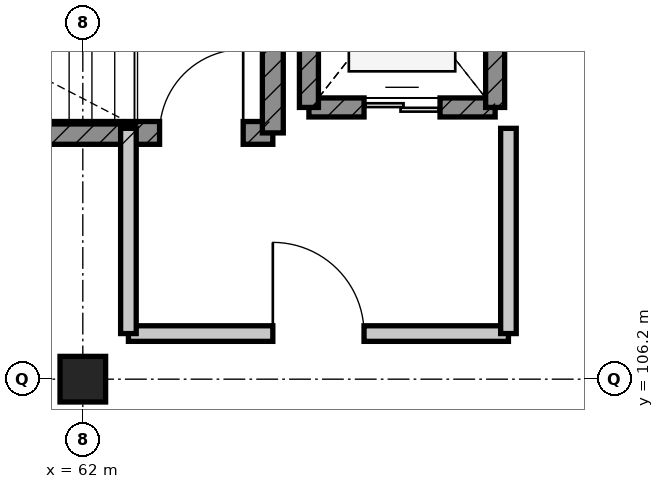
"""IFC4 building model, lengths in metres.
Left out: names, types, materials, properties, quantities, classifications, styles, units other than length and angle.
Written with IfcOpenShell. Run it as: python <this file> out.ifc"""

import sys

from ifc_helpers import new_model, si_unit, direction, frame, frame_2d, origin, origin_2d, place, context, subcontext, project, spatial, rectangle, extrude, element, fill, save


model = new_model("IFC4")
c1 = context("Model", 3, precision=1e-05, world=origin(), true_north=direction((0.0, 1.0)))
c2 = subcontext(c1, "Body", "Model", "MODEL_VIEW")
j1 = project(units=[si_unit("LENGTHUNIT", "METRE"), si_unit("PLANEANGLEUNIT", "RADIAN")], contexts=[c1])
p1 = place(None, origin())
s1 = spatial("IfcSite", under=j1, at=p1, CompositionType="ELEMENT")
p2 = place(p1, origin())
s2 = spatial("IfcBuilding", under=s1, at=p2, CompositionType="ELEMENT")
p3 = place(p2, frame((0.0, 0.0, 33.6)))
s3 = spatial("IfcBuildingStorey", under=s2, at=p3, CompositionType="ELEMENT", Elevation=33.6)
p4 = place(p3, frame((62.0, 106.2, 0.0), z_axis=(0.0, 0.0, 1.0), x_axis=(1.0, 0.0, 0.0)))
e1 = element("IfcColumn", 1, at=p4, inside=s3, PredefinedType="COLUMN", context=c2, shape_type="SweptSolid", body=[
    extrude(rectangle(XDim=0.6, YDim=0.6, at=origin_2d()), origin(), (0.0, 0.0, 1.0), 3.6),
])
p5 = place(p3, frame((56.1, 109.44, 0.0), z_axis=(0.0, 0.0, 1.0), x_axis=(1.0, 0.0, 0.0)))
e2 = element("IfcWall", 2, at=p5, inside=s3, PredefinedType="SHEAR", context=c2, shape_type="SweptSolid", body=[
    extrude(rectangle(XDim=8.4, YDim=0.3, at=frame_2d((4.2, 0.0))), origin(), (0.0, 0.0, 1.0), 3.36),
])
p6 = place(p5, frame((6.91, 0.0, 0.0)))
e3 = element("IfcOpeningElement", 3, at=p6, cuts=e2, PredefinedType="OPENING", context=c2, shape_type="SweptSolid", body=[
    extrude(rectangle(XDim=1.1, YDim=2.1, at=frame_2d((0.55, 1.05))), frame((0.0, 0.16, 0.0), z_axis=(0.0, -1.0, 0.0), x_axis=(1.0, 0.0, 0.0)), (0.0, 0.0, 1.0), 0.32),
])
p7 = place(p3, frame((64.5, 109.44, 0.0), z_axis=(0.0, 0.0, 1.0), x_axis=(0.0, 1.0, 0.0)))
e4 = element("IfcWall", 4, at=p7, inside=s3, PredefinedType="SHEAR", context=c2, shape_type="SweptSolid", body=[
    extrude(rectangle(XDim=3.56, YDim=0.275, at=frame_2d((1.78, 0.0))), origin(), (0.0, 0.0, 1.0), 3.36),
])
p8 = place(p3, frame((64.975, 109.775, 0.0), z_axis=(0.0, 0.0, 1.0), x_axis=(1.0, 0.0, 0.0)))
e5 = element("IfcWall", 5, at=p8, inside=s3, PredefinedType="SHEAR", context=c2, shape_type="SweptSolid", body=[
    extrude(rectangle(XDim=2.45, YDim=0.25, at=frame_2d((1.225, 0.0))), origin(), (0.0, 0.0, 1.0), 3.36),
])
p9 = place(p8, frame((0.725, 0.0, 0.0)))
e6 = element("IfcOpeningElement", 6, at=p9, cuts=e5, PredefinedType="OPENING", context=c2, shape_type="SweptSolid", body=[
    extrude(rectangle(XDim=1.0, YDim=2.15, at=frame_2d((0.5, 1.075))), frame((0.0, 0.135, 0.0), z_axis=(0.0, -1.0, 0.0), x_axis=(1.0, 0.0, 0.0)), (0.0, 0.0, 1.0), 0.27),
])
for number, where, z_axis, x_axis in (
    (7, (67.425, 109.775, 0.0), (0.0, 0.0, 1.0), (0.0, 1.0, 0.0)),
    (8, (64.975, 112.825, 0.0), (0.0, 0.0, 1.0), (0.0, -1.0, 0.0)),
):
    element("IfcWall", number, at=place(p3, frame(where, z_axis=z_axis, x_axis=x_axis)), inside=s3, PredefinedType="SHEAR", context=c2, shape_type="SweptSolid", body=[
        extrude(rectangle(XDim=3.05, YDim=0.25, at=frame_2d((1.525, 0.0))), origin(), (0.0, 0.0, 1.0), 3.36),
    ])
p10 = place(p3, frame((62.6, 106.8, 0.0), z_axis=(0.0, 0.0, 1.0), x_axis=(1.0, 0.0, 0.0)))
e9 = element("IfcWall", 9, at=p10, inside=s3, PredefinedType="PARTITIONING", context=c2, shape_type="SweptSolid", body=[
    extrude(rectangle(XDim=5.0, YDim=0.205, at=frame_2d((2.5, 0.0))), origin(), (0.0, 0.0, 1.0), 3.36),
])
p11 = place(p10, frame((1.9, 0.0, 0.0)))
e10 = element("IfcOpeningElement", 10, at=p11, cuts=e9, PredefinedType="OPENING", context=c2, shape_type="SweptSolid", body=[
    extrude(rectangle(XDim=1.2, YDim=2.1, at=frame_2d((0.6, 1.05))), frame((0.0, 0.113, 0.0), z_axis=(0.0, -1.0, 0.0), x_axis=(1.0, 0.0, 0.0)), (0.0, 0.0, 1.0), 0.225),
])
for number, where, z_axis, x_axis in (
    (11, (67.6, 106.8, 0.0), (0.0, 0.0, 1.0), (0.0, 1.0, 0.0)),
    (12, (62.6, 109.5, 0.0), (0.0, 0.0, 1.0), (0.0, -1.0, 0.0)),
):
    element("IfcWall", number, at=place(p3, frame(where, z_axis=z_axis, x_axis=x_axis)), inside=s3, PredefinedType="PARTITIONING", context=c2, shape_type="SweptSolid", body=[
        extrude(rectangle(XDim=2.7, YDim=0.205, at=frame_2d((1.35, 0.0))), origin(), (0.0, 0.0, 1.0), 3.36),
    ])
p12 = place(p6, origin())
e13 = element("IfcDoor", 13, at=p12, inside=s3, OperationType="SINGLE_SWING_RIGHT", PredefinedType="DOOR", context=c2, shape_type="SweptSolid", body=[
    extrude(rectangle(XDim=1.1, YDim=2.1, at=frame_2d((0.55, 1.05))), frame((0.0, 0.025, 0.0), z_axis=(0.0, -1.0, 0.0), x_axis=(1.0, 0.0, 0.0)), (0.0, 0.0, 1.0), 0.05),
])
fill(e3, e13)
p13 = place(p9, origin())
e14 = element("IfcDoor", 14, at=p13, inside=s3, OperationType="DOUBLE_DOOR_SLIDING", PredefinedType="DOOR", context=c2, shape_type="SweptSolid", body=[
    extrude(rectangle(XDim=1.0, YDim=2.15, at=frame_2d((0.5, 1.075))), frame((0.0, 0.025, 0.0), z_axis=(0.0, -1.0, 0.0), x_axis=(1.0, 0.0, 0.0)), (0.0, 0.0, 1.0), 0.05),
])
fill(e6, e14)
p14 = place(p11, origin())
e15 = element("IfcDoor", 15, at=p14, inside=s3, OperationType="SINGLE_SWING_LEFT", PredefinedType="DOOR", context=c2, shape_type="SweptSolid", body=[
    extrude(rectangle(XDim=1.2, YDim=2.1, at=frame_2d((0.6, 1.05))), frame((0.0, 0.025, 0.0), z_axis=(0.0, -1.0, 0.0), x_axis=(1.0, 0.0, 0.0)), (0.0, 0.0, 1.0), 0.05),
])
fill(e10, e15)
save(model, sys.argv[1])
